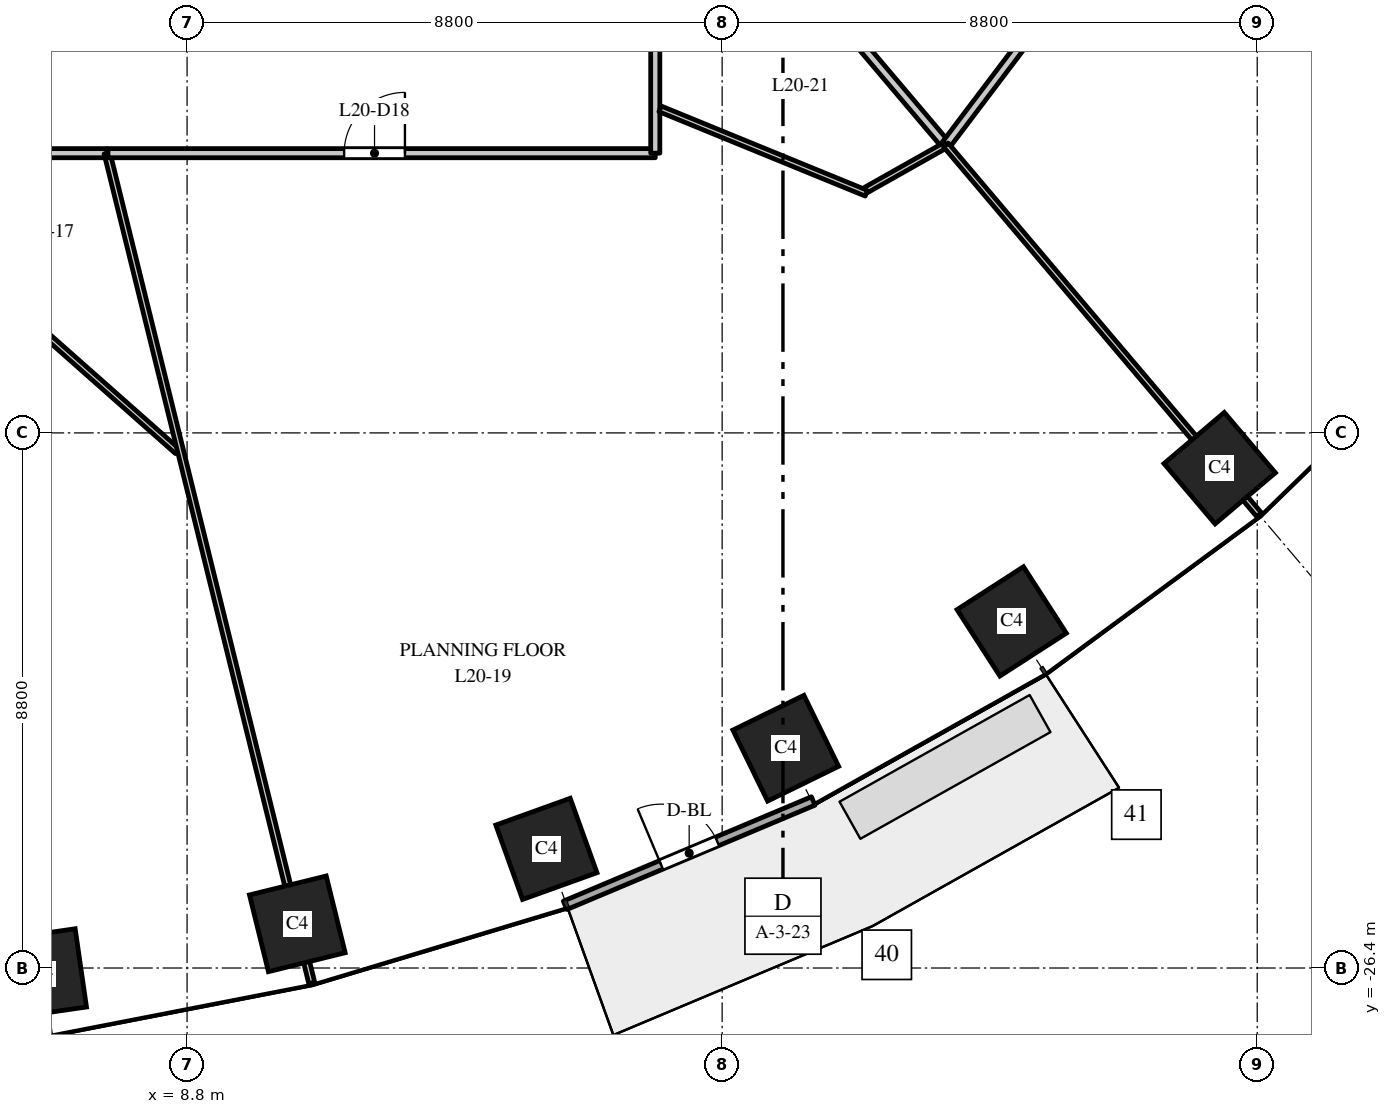
"""IFC4 building model, lengths in metres.
Left out: names, types, materials, properties, quantities, classifications, styles, units other than length and angle.
Written with IfcOpenShell. Run it as: python <this file> out.ifc"""

import sys

from ifc_helpers import new_model, si_unit, direction, frame, frame_2d, origin, origin_2d, place, context, subcontext, project, spatial, rectangle, extrude, element, fill, save


model = new_model("IFC4")
c1 = context("Model", 3, precision=1e-05, world=origin(), true_north=direction((0.0, 1.0)))
c2 = subcontext(c1, "Body", "Model", "MODEL_VIEW")
j1 = project(units=[si_unit("LENGTHUNIT", "METRE"), si_unit("PLANEANGLEUNIT", "RADIAN")], contexts=[c1])
p1 = place(None, origin())
s1 = spatial("IfcSite", under=j1, at=p1, CompositionType="ELEMENT")
p2 = place(p1, origin())
s2 = spatial("IfcBuilding", under=s1, at=p2, CompositionType="ELEMENT")
p3 = place(p2, frame((0.0, 0.0, 92.0)))
s3 = spatial("IfcBuildingStorey", under=s2, at=p3, CompositionType="ELEMENT", Elevation=92.0)
for number, where, z_axis, x_axis in (
    (1, (6.409, -26.491, 0.0), (0.0, 0.0, 1.0), (0.99, 0.143, 0.0)),
    (2, (10.613, -25.674, 0.0), (0.0, 0.0, 1.0), (0.971, 0.24, 0.0)),
    (3, (14.709, -24.441, 0.0), (0.0, 0.0, 1.0), (0.941, 0.338, 0.0)),
    (4, (18.646, -22.785, 0.0), (0.0, 0.0, 1.0), (0.898, 0.439, 0.0)),
    (5, (22.362, -20.7, 0.0), (0.0, 0.0, 1.0), (0.84, 0.542, 0.0)),
    (6, (25.783, -18.18, 0.0), (0.0, 0.0, 1.0), (0.763, 0.646, 0.0)),
):
    element("IfcColumn", number, at=place(p3, frame(where, z_axis=z_axis, x_axis=x_axis)), inside=s3, PredefinedType="COLUMN", context=c2, shape_type="SweptSolid", body=[
        extrude(rectangle(XDim=1.3, YDim=1.3, at=origin_2d()), origin(), (0.0, 0.0, 1.0), 4.0),
    ])
p4 = place(p3, frame((15.018, -25.369, 0.0), z_axis=(0.0, 0.0, 1.0), x_axis=(0.921816985161, 0.387625393736, 0.0)))
e7 = element("IfcWall", 7, at=p4, inside=s3, PredefinedType="STANDARD", context=c2, shape_type="SweptSolid", body=[
    extrude(rectangle(XDim=4.426, YDim=0.15, at=frame_2d((2.213, 0.0))), origin(), (0.0, 0.0, 1.0), 3.7),
])
p5 = place(p4, frame((1.713, 0.0, 0.0)))
e8 = element("IfcOpeningElement", 8, at=p5, cuts=e7, PredefinedType="OPENING", context=c2, shape_type="SweptSolid", body=[
    extrude(rectangle(XDim=1.0, YDim=2.4, at=frame_2d((0.5, 1.2))), frame((0.0, 0.085, 0.0), z_axis=(0.0, -1.0, 0.0), x_axis=(1.0, 0.0, 0.0)), (0.0, 0.0, 1.0), 0.17),
])
p6 = place(p3, frame((0.163, -13.0, 0.0), z_axis=(0.0, 0.0, 1.0), x_axis=(1.0, 0.0, 0.0)))
e9 = element("IfcWall", 9, at=p6, inside=s3, PredefinedType="PARTITIONING", context=c2, shape_type="SweptSolid", body=[
    extrude(rectangle(XDim=7.32, YDim=0.15, at=frame_2d((3.66, 0.0))), origin(), (0.0, 0.0, 1.0), 2.85),
])
p7 = place(p6, frame((4.586, 0.0, 0.0)))
e10 = element("IfcOpeningElement", 10, at=p7, cuts=e9, PredefinedType="OPENING", context=c2, shape_type="SweptSolid", body=[
    extrude(rectangle(XDim=1.0, YDim=2.1, at=frame_2d((0.5, 1.05))), frame((0.0, 0.085, 0.0), z_axis=(0.0, -1.0, 0.0), x_axis=(1.0, 0.0, 0.0)), (0.0, 0.0, 1.0), 0.17),
])
p8 = place(p3, frame((3.187, -13.078, 0.0), z_axis=(0.0, 0.0, 1.0), x_axis=(0.749027274438, -0.662539162728, 0.0)))
e11 = element("IfcWall", 11, at=p8, inside=s3, PredefinedType="PARTITIONING", context=c2, shape_type="SweptSolid", body=[
    extrude(rectangle(XDim=7.283, YDim=0.1, at=frame_2d((3.642, 0.0))), origin(), (0.0, 0.0, 1.0), 2.85),
])
p9 = place(p3, frame((7.484, -13.0, 0.0), z_axis=(0.0, 0.0, 1.0), x_axis=(0.239551123524, -0.97088375165, 0.0)))
e12 = element("IfcWall", 12, at=p9, inside=s3, PredefinedType="PARTITIONING", context=c2, shape_type="SweptSolid", body=[
    extrude(rectangle(XDim=14.056, YDim=0.1, at=frame_2d((7.028, 0.0))), origin(), (0.0, 0.0, 1.0), 2.9),
])
p10 = place(p3, frame((7.499, -13.0, 0.0), z_axis=(0.0, 0.0, 1.0), x_axis=(1.0, 0.0, 0.0)))
e13 = element("IfcWall", 13, at=p10, inside=s3, PredefinedType="PARTITIONING", context=c2, shape_type="SweptSolid", body=[
    extrude(rectangle(XDim=9.001, YDim=0.15, at=frame_2d((4.5, 0.0))), origin(), (0.0, 0.0, 1.0), 2.85),
])
p11 = place(p10, frame((3.884, 0.0, 0.0)))
e14 = element("IfcOpeningElement", 14, at=p11, cuts=e13, PredefinedType="OPENING", context=c2, shape_type="SweptSolid", body=[
    extrude(rectangle(XDim=1.0, YDim=2.1, at=frame_2d((0.5, 1.05))), frame((0.0, 0.085, 0.0), z_axis=(0.0, -1.0, 0.0), x_axis=(1.0, 0.0, 0.0)), (0.0, 0.0, 1.0), 0.17),
])
p12 = place(p3, frame((16.5, -13.0, 0.0), z_axis=(0.0, 0.0, 1.0), x_axis=(0.0, 1.0, 0.0)))
e15 = element("IfcWall", 15, at=p12, inside=s3, PredefinedType="PARTITIONING", context=c2, shape_type="SweptSolid", body=[
    extrude(rectangle(XDim=2.3, YDim=0.15, at=frame_2d((1.15, 0.0))), origin(), (0.0, 0.0, 1.0), 3.7),
])
p13 = place(p3, frame((16.579, -12.271, 0.0), z_axis=(0.0, 0.0, 1.0), x_axis=(0.925550138862, -0.378625065801, 0.0)))
e16 = element("IfcWall", 16, at=p13, inside=s3, PredefinedType="PARTITIONING", context=c2, shape_type="SweptSolid", body=[
    extrude(rectangle(XDim=3.666, YDim=0.1, at=frame_2d((1.833, 0.0))), origin(), (0.0, 0.0, 1.0), 3.7),
])
p14 = place(p3, frame((19.511, -10.778, 0.0), z_axis=(0.0, 0.0, 1.0), x_axis=(0.64641426768, -0.762986628021, 0.0)))
e17 = element("IfcWall", 17, at=p14, inside=s3, PredefinedType="PARTITIONING", context=c2, shape_type="SweptSolid", body=[
    extrude(rectangle(XDim=2.735, YDim=0.15, at=frame_2d((1.368, 0.0))), origin(), (0.0, 0.0, 1.0), 3.7),
])
p15 = place(p3, frame((19.969, -13.604, 0.0), z_axis=(0.0, 0.0, 1.0), x_axis=(0.870976686736, 0.491324344158, 0.0)))
e18 = element("IfcWall", 18, at=p15, inside=s3, PredefinedType="PARTITIONING", context=c2, shape_type="SweptSolid", body=[
    extrude(rectangle(XDim=1.504, YDim=0.1, at=frame_2d((0.752, 0.0))), origin(), (0.0, 0.0, 1.0), 3.7),
])
p16 = place(p3, frame((21.279, -12.865, 0.0), z_axis=(0.0, 0.0, 1.0), x_axis=(0.603433696796, 0.797413176196, 0.0)))
e19 = element("IfcWall", 19, at=p16, inside=s3, PredefinedType="PARTITIONING", context=c2, shape_type="SweptSolid", body=[
    extrude(rectangle(XDim=2.805, YDim=0.15, at=frame_2d((1.403, 0.0))), origin(), (0.0, 0.0, 1.0), 2.75),
])
p17 = place(p3, frame((21.279, -12.865, 0.0), z_axis=(0.0, 0.0, 1.0), x_axis=(0.646395355102, -0.763002650652, 0.0)))
e20 = element("IfcWall", 20, at=p17, inside=s3, PredefinedType="PARTITIONING", context=c2, shape_type="SweptSolid", body=[
    extrude(rectangle(XDim=7.969, YDim=0.1, at=frame_2d((3.984, 0.0))), origin(), (0.0, 0.0, 1.0), 2.9),
])
p18 = place(p5, origin())
e21 = element("IfcDoor", 21, at=p18, inside=s3, OperationType="SINGLE_SWING_LEFT", PredefinedType="DOOR", context=c2, shape_type="SweptSolid", body=[
    extrude(rectangle(XDim=1.0, YDim=2.4, at=frame_2d((0.5, 1.2))), frame((0.0, 0.025, 0.0), z_axis=(0.0, -1.0, 0.0), x_axis=(1.0, 0.0, 0.0)), (0.0, 0.0, 1.0), 0.05),
])
fill(e8, e21)
p19 = place(p11, origin())
e22 = element("IfcDoor", 22, at=p19, inside=s3, OperationType="SINGLE_SWING_RIGHT", PredefinedType="DOOR", context=c2, shape_type="SweptSolid", body=[
    extrude(rectangle(XDim=1.0, YDim=2.1, at=frame_2d((0.5, 1.05))), frame((0.0, 0.025, 0.0), z_axis=(0.0, -1.0, 0.0), x_axis=(1.0, 0.0, 0.0)), (0.0, 0.0, 1.0), 0.05),
])
fill(e14, e22)
save(model, sys.argv[1])
